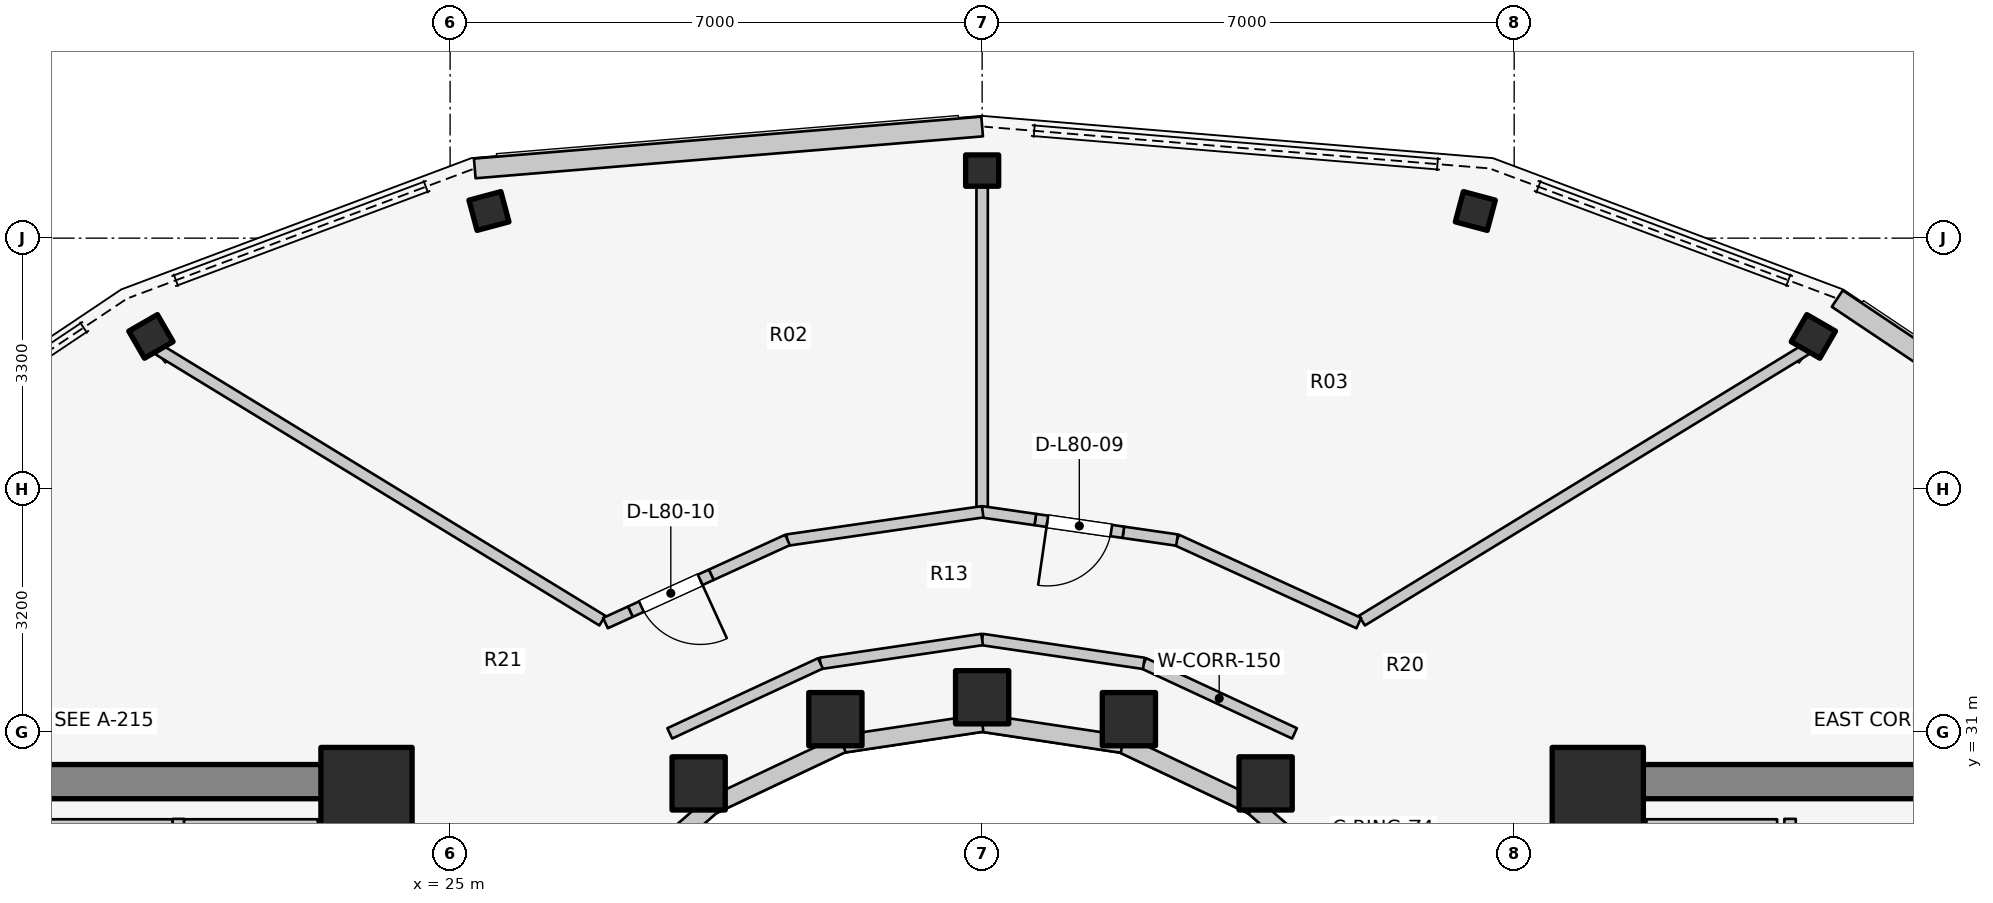
"""IFC4 building model, lengths in metres.
Left out: names, types, materials, properties, quantities, classifications, styles, units other than length and angle.
Written with IfcOpenShell. Run it as: python <this file> out.ifc"""

import sys

from ifc_helpers import new_model, si_unit, direction, frame, frame_2d, origin, origin_2d, place, context, subcontext, project, spatial, rectangle, i_section, extrude, element, fill, save


model = new_model("IFC4")
c1 = context("Model", 3, precision=1e-05, world=origin(), true_north=direction((0.0, 1.0)))
c2 = subcontext(c1, "Body", "Model", "MODEL_VIEW")
j1 = project(units=[si_unit("LENGTHUNIT", "METRE"), si_unit("PLANEANGLEUNIT", "RADIAN")], contexts=[c1])
p1 = place(None, origin())
s1 = spatial("IfcSite", under=j1, at=p1, CompositionType="ELEMENT")
p2 = place(p1, origin())
s2 = spatial("IfcBuilding", under=s1, at=p2, CompositionType="ELEMENT")
p3 = place(p2, frame((0.0, 0.0, 263.6)))
s3 = spatial("IfcBuildingStorey", under=s2, at=p3, CompositionType="ELEMENT", Elevation=263.6)
for number, where, z_axis, x_axis in (
    (1, (19.65, 30.35, 0.0), (0.0, 0.0, 1.0), (1.0, 0.0, 0.0)),
    (2, (39.85, 30.35, 0.0), (0.0, 0.0, 1.0), (1.0, 0.0, 0.0)),
):
    element("IfcWall", number, at=place(p3, frame(where, z_axis=z_axis, x_axis=x_axis)), inside=s3, PredefinedType="SHEAR", context=c2, shape_type="SweptSolid", body=[
        extrude(rectangle(XDim=4.5, YDim=0.45, at=frame_2d((2.25, 0.0))), origin(), (0.0, 0.0, 1.0), 3.2),
    ])
for number, where, z_axis, x_axis in (
    (3, (23.9, 30.2, 0.0), (0.0, 0.0, 1.0), (1.0, 0.0, 0.0)),
    (4, (40.1, 30.2, 0.0), (0.0, 0.0, 1.0), (1.0, 0.0, 0.0)),
):
    element("IfcColumn", number, at=place(p3, frame(where, z_axis=z_axis, x_axis=x_axis)), inside=s3, PredefinedType="COLUMN", context=c2, shape_type="SweptSolid", body=[
        extrude(rectangle(XDim=1.2, YDim=1.2, at=origin_2d()), origin(), (0.0, 0.0, 1.0), 3.2),
    ])
p4 = place(p3, frame((35.73, 30.327, 0.0), z_axis=(0.0, 0.0, 1.0), x_axis=(1.0, 0.0, 0.0)))
e5 = element("IfcColumn", 5, at=p4, inside=s3, PredefinedType="COLUMN", context=c2, shape_type="SweptSolid", body=[
    extrude(rectangle(XDim=0.7, YDim=0.7, at=origin_2d()), origin(), (0.0, 0.0, 1.0), 3.2),
])
p5 = place(p3, frame((42.936, 36.207, 0.0), z_axis=(0.0, 0.0, 1.0), x_axis=(0.5, 0.866025403784, 0.0)))
e6 = element("IfcColumn", 6, at=p5, inside=s3, PredefinedType="COLUMN", context=c2, shape_type="SweptSolid", body=[
    extrude(i_section(OverallWidth=0.412, OverallDepth=0.435, WebThickness=0.036, FlangeThickness=0.057, FilletRadius=0.025, at=origin_2d()), origin(), (0.0, 0.0, 1.0), 3.2),
])
p6 = place(p3, frame((33.931, 31.172, 0.0), z_axis=(0.0, 0.0, 1.0), x_axis=(1.0, 0.0, 0.0)))
e7 = element("IfcColumn", 7, at=p6, inside=s3, PredefinedType="COLUMN", context=c2, shape_type="SweptSolid", body=[
    extrude(rectangle(XDim=0.7, YDim=0.7, at=origin_2d()), origin(), (0.0, 0.0, 1.0), 3.2),
])
p7 = place(p3, frame((38.489, 37.857, 0.0), z_axis=(0.0, 0.0, 1.0), x_axis=(0.258819045103, 0.965925826289, 0.0)))
e8 = element("IfcColumn", 8, at=p7, inside=s3, PredefinedType="COLUMN", context=c2, shape_type="SweptSolid", body=[
    extrude(i_section(OverallWidth=0.412, OverallDepth=0.435, WebThickness=0.036, FlangeThickness=0.057, FilletRadius=0.025, at=origin_2d()), origin(), (0.0, 0.0, 1.0), 3.2),
])
p8 = place(p3, frame((32.0, 31.46, 0.0), z_axis=(0.0, 0.0, 1.0), x_axis=(1.0, 0.0, 0.0)))
e9 = element("IfcColumn", 9, at=p8, inside=s3, PredefinedType="COLUMN", context=c2, shape_type="SweptSolid", body=[
    extrude(rectangle(XDim=0.7, YDim=0.7, at=origin_2d()), origin(), (0.0, 0.0, 1.0), 3.2),
])
p9 = place(p3, frame((32.0, 38.389, 0.0), z_axis=(0.0, 0.0, 1.0), x_axis=(0.0, 1.0, 0.0)))
e10 = element("IfcColumn", 10, at=p9, inside=s3, PredefinedType="COLUMN", context=c2, shape_type="SweptSolid", body=[
    extrude(i_section(OverallWidth=0.412, OverallDepth=0.435, WebThickness=0.036, FlangeThickness=0.057, FilletRadius=0.025, at=origin_2d()), origin(), (0.0, 0.0, 1.0), 3.2),
])
p10 = place(p3, frame((30.069, 31.172, 0.0), z_axis=(0.0, 0.0, 1.0), x_axis=(1.0, 0.0, 0.0)))
e11 = element("IfcColumn", 11, at=p10, inside=s3, PredefinedType="COLUMN", context=c2, shape_type="SweptSolid", body=[
    extrude(rectangle(XDim=0.7, YDim=0.7, at=origin_2d()), origin(), (0.0, 0.0, 1.0), 3.2),
])
p11 = place(p3, frame((25.511, 37.857, 0.0), z_axis=(0.0, 0.0, 1.0), x_axis=(-0.258819045103, 0.965925826289, 0.0)))
e12 = element("IfcColumn", 12, at=p11, inside=s3, PredefinedType="COLUMN", context=c2, shape_type="SweptSolid", body=[
    extrude(i_section(OverallWidth=0.412, OverallDepth=0.435, WebThickness=0.036, FlangeThickness=0.057, FilletRadius=0.025, at=origin_2d()), origin(), (0.0, 0.0, 1.0), 3.2),
])
p12 = place(p3, frame((28.27, 30.327, 0.0), z_axis=(0.0, 0.0, 1.0), x_axis=(1.0, 0.0, 0.0)))
e13 = element("IfcColumn", 13, at=p12, inside=s3, PredefinedType="COLUMN", context=c2, shape_type="SweptSolid", body=[
    extrude(rectangle(XDim=0.7, YDim=0.7, at=origin_2d()), origin(), (0.0, 0.0, 1.0), 3.2),
])
p13 = place(p3, frame((21.064, 36.207, 0.0), z_axis=(0.0, 0.0, 1.0), x_axis=(-0.5, 0.866025403784, 0.0)))
e14 = element("IfcColumn", 14, at=p13, inside=s3, PredefinedType="COLUMN", context=c2, shape_type="SweptSolid", body=[
    extrude(i_section(OverallWidth=0.412, OverallDepth=0.435, WebThickness=0.036, FlangeThickness=0.057, FilletRadius=0.025, at=origin_2d()), origin(), (0.0, 0.0, 1.0), 3.2),
])
p14 = place(p3, frame((37.035, 28.742, 0.0), z_axis=(0.0, 0.0, 1.0), x_axis=(-0.752576694707, 0.658504607869, 0.0)))
e15 = element("IfcWall", 15, at=p14, inside=s3, PredefinedType="STANDARD", context=c2, shape_type="SweptSolid", body=[
    extrude(rectangle(XDim=1.959, YDim=0.23, at=frame_2d((0.98, 0.0))), origin(), (0.0, 0.0, 1.0), 1.32),
])
p15 = place(p3, frame((35.56, 30.032, 0.0), z_axis=(0.0, 0.0, 1.0), x_axis=(-0.904179699603, 0.427152280606, 0.0)))
e16 = element("IfcWall", 16, at=p15, inside=s3, PredefinedType="STANDARD", context=c2, shape_type="SweptSolid", body=[
    extrude(rectangle(XDim=1.899, YDim=0.23, at=frame_2d((0.95, 0.0))), origin(), (0.0, 0.0, 1.0), 1.32),
])
for number, where, z_axis, x_axis in (
    (17, (33.843, 30.843, 0.0), (0.0, 0.0, 1.0), (-0.989, 0.149, 0.0)),
    (18, (32.0, 31.12, 0.0), (0.0, 0.0, 1.0), (-0.989, -0.149, 0.0)),
):
    element("IfcWall", number, at=place(p3, frame(where, z_axis=z_axis, x_axis=x_axis)), inside=s3, PredefinedType="STANDARD", context=c2, shape_type="SweptSolid", body=[
        extrude(rectangle(XDim=1.864, YDim=0.23, at=frame_2d((0.932, 0.0))), origin(), (0.0, 0.0, 1.0), 1.32),
    ])
p16 = place(p3, frame((30.157, 30.843, 0.0), z_axis=(0.0, 0.0, 1.0), x_axis=(-0.904179699603, -0.427152280606, 0.0)))
e19 = element("IfcWall", 19, at=p16, inside=s3, PredefinedType="STANDARD", context=c2, shape_type="SweptSolid", body=[
    extrude(rectangle(XDim=1.899, YDim=0.23, at=frame_2d((0.95, 0.0))), origin(), (0.0, 0.0, 1.0), 1.32),
])
p17 = place(p3, frame((28.44, 30.032, 0.0), z_axis=(0.0, 0.0, 1.0), x_axis=(-0.752576694707, -0.658504607869, 0.0)))
e20 = element("IfcWall", 20, at=p17, inside=s3, PredefinedType="STANDARD", context=c2, shape_type="SweptSolid", body=[
    extrude(rectangle(XDim=1.959, YDim=0.23, at=frame_2d((0.98, 0.0))), origin(), (0.0, 0.0, 1.0), 1.32),
])
p18 = place(p3, frame((46.746, 34.365, 0.0), z_axis=(0.0, 0.0, 1.0), x_axis=(-0.83095030216, 0.556346650336, 0.0)))
e21 = element("IfcWall", 21, at=p18, inside=s3, PredefinedType="STANDARD", context=c2, shape_type="SweptSolid", body=[
    extrude(rectangle(XDim=4.206, YDim=0.26, at=frame_2d((2.103, 0.0))), origin(), (0.0, 0.0, 1.0), 1.32),
])
p19 = place(p3, frame((32.0, 38.969, 0.0), z_axis=(0.0, 0.0, 1.0), x_axis=(-0.996601833255, -0.08236981214, 0.0)))
e22 = element("IfcWall", 22, at=p19, inside=s3, PredefinedType="STANDARD", context=c2, shape_type="SweptSolid", body=[
    extrude(rectangle(XDim=6.698, YDim=0.26, at=frame_2d((3.349, 0.0))), origin(), (0.0, 0.0, 1.0), 1.32),
])
p20 = place(p3, frame((19.59, 29.78, 0.0), z_axis=(0.0, 0.0, 1.0), x_axis=(1.0, 0.0, 0.0)))
e23 = element("IfcWall", 23, at=p20, inside=s3, PredefinedType="SOLIDWALL", context=c2, shape_type="SweptSolid", body=[
    extrude(rectangle(XDim=1.76, YDim=0.15, at=frame_2d((0.88, 0.0))), origin(), (0.0, 0.0, 1.0), 2.915),
])
p21 = place(p3, frame((21.425, 27.14, 0.0), z_axis=(0.0, 0.0, 1.0), x_axis=(0.0, 1.0, 0.0)))
e24 = element("IfcWall", 24, at=p21, inside=s3, PredefinedType="SOLIDWALL", context=c2, shape_type="SweptSolid", body=[
    extrude(rectangle(XDim=2.72, YDim=0.15, at=frame_2d((1.36, 0.0))), origin(), (0.0, 0.0, 1.0), 2.915),
])
p22 = place(p3, frame((21.5, 29.78, 0.0), z_axis=(0.0, 0.0, 1.0), x_axis=(1.0, 0.0, 0.0)))
e25 = element("IfcWall", 25, at=p22, inside=s3, PredefinedType="SOLIDWALL", context=c2, shape_type="SweptSolid", body=[
    extrude(rectangle(XDim=1.76, YDim=0.15, at=frame_2d((0.88, 0.0))), origin(), (0.0, 0.0, 1.0), 2.915),
])
p23 = place(p3, frame((23.43, 27.14, 0.0), z_axis=(0.0, 0.0, 1.0), x_axis=(0.0, 1.0, 0.0)))
e26 = element("IfcWall", 26, at=p23, inside=s3, PredefinedType="SOLIDWALL", context=c2, shape_type="SweptSolid", body=[
    extrude(rectangle(XDim=2.72, YDim=0.15, at=frame_2d((1.36, 0.0))), origin(), (0.0, 0.0, 1.0), 1.57),
])
p24 = place(p3, frame((40.74, 29.78, 0.0), z_axis=(0.0, 0.0, 1.0), x_axis=(1.0, 0.0, 0.0)))
e27 = element("IfcWall", 27, at=p24, inside=s3, PredefinedType="SOLIDWALL", context=c2, shape_type="SweptSolid", body=[
    extrude(rectangle(XDim=1.72, YDim=0.15, at=frame_2d((0.86, 0.0))), origin(), (0.0, 0.0, 1.0), 2.915),
])
p25 = place(p3, frame((40.57, 27.14, 0.0), z_axis=(0.0, 0.0, 1.0), x_axis=(0.0, 1.0, 0.0)))
e28 = element("IfcWall", 28, at=p25, inside=s3, PredefinedType="SOLIDWALL", context=c2, shape_type="SweptSolid", body=[
    extrude(rectangle(XDim=2.72, YDim=0.15, at=frame_2d((1.36, 0.0))), origin(), (0.0, 0.0, 1.0), 1.57),
])
p26 = place(p3, frame((42.63, 27.14, 0.0), z_axis=(0.0, 0.0, 1.0), x_axis=(0.0, 1.0, 0.0)))
e29 = element("IfcWall", 29, at=p26, inside=s3, PredefinedType="SOLIDWALL", context=c2, shape_type="SweptSolid", body=[
    extrude(rectangle(XDim=2.72, YDim=0.15, at=frame_2d((1.36, 0.0))), origin(), (0.0, 0.0, 1.0), 2.915),
])
p27 = place(p3, frame((36.11, 30.985, 0.0), z_axis=(0.0, 0.0, 1.0), x_axis=(-0.906943449489, 0.421252393975, 0.0)))
e30 = element("IfcWall", 30, at=p27, inside=s3, PredefinedType="PARTITIONING", context=c2, shape_type="SweptSolid", body=[
    extrude(rectangle(XDim=2.186, YDim=0.15, at=frame_2d((1.093, 0.0))), origin(), (0.0, 0.0, 1.0), 1.32),
])
for number, where, z_axis, x_axis in (
    (31, (34.127, 31.906, 0.0), (0.0, 0.0, 1.0), (-0.989, 0.146, 0.0)),
    (32, (32.0, 32.22, 0.0), (0.0, 0.0, 1.0), (-0.989, -0.146, 0.0)),
):
    element("IfcWall", number, at=place(p3, frame(where, z_axis=z_axis, x_axis=x_axis)), inside=s3, PredefinedType="PARTITIONING", context=c2, shape_type="SweptSolid", body=[
        extrude(rectangle(XDim=2.151, YDim=0.15, at=frame_2d((1.075, 0.0))), origin(), (0.0, 0.0, 1.0), 1.32),
    ])
p28 = place(p3, frame((29.873, 31.906, 0.0), z_axis=(0.0, 0.0, 1.0), x_axis=(-0.906943449489, -0.421252393975, 0.0)))
e33 = element("IfcWall", 33, at=p28, inside=s3, PredefinedType="PARTITIONING", context=c2, shape_type="SweptSolid", body=[
    extrude(rectangle(XDim=2.186, YDim=0.15, at=frame_2d((1.093, 0.0))), origin(), (0.0, 0.0, 1.0), 1.32),
])
p29 = place(p3, frame((36.997, 32.469, 0.0), z_axis=(0.0, 0.0, 1.0), x_axis=(0.853465247428, 0.521149759122, 0.0)))
e34 = element("IfcWall", 34, at=p29, inside=s3, PredefinedType="PARTITIONING", context=c2, shape_type="SweptSolid", body=[
    extrude(rectangle(XDim=6.842, YDim=0.15, at=frame_2d((3.421, 0.0))), origin(), (0.0, 0.0, 1.0), 1.32),
])
p30 = place(p3, frame((32.0, 33.955, 0.0), z_axis=(0.0, 0.0, 1.0), x_axis=(0.0, 1.0, 0.0)))
e35 = element("IfcWall", 35, at=p30, inside=s3, PredefinedType="PARTITIONING", context=c2, shape_type="SweptSolid", body=[
    extrude(rectangle(XDim=4.234, YDim=0.15, at=frame_2d((2.117, 0.0))), origin(), (0.0, 0.0, 1.0), 1.32),
])
p31 = place(p3, frame((27.003, 32.469, 0.0), z_axis=(0.0, 0.0, 1.0), x_axis=(-0.853465247428, 0.521149759122, 0.0)))
e36 = element("IfcWall", 36, at=p31, inside=s3, PredefinedType="PARTITIONING", context=c2, shape_type="SweptSolid", body=[
    extrude(rectangle(XDim=6.842, YDim=0.15, at=frame_2d((3.421, 0.0))), origin(), (0.0, 0.0, 1.0), 1.32),
])
p32 = place(p3, frame((36.956, 32.436, 0.0), z_axis=(0.0, 0.0, 1.0), x_axis=(-0.909736731002, 0.415185597373, 0.0)))
e37 = element("IfcWall", 37, at=p32, inside=s3, PredefinedType="PARTITIONING", context=c2, shape_type="SweptSolid", body=[
    extrude(rectangle(XDim=2.633, YDim=0.15, at=frame_2d((1.317, 0.0))), origin(), (0.0, 0.0, 1.0), 1.32),
])
p33 = place(p3, frame((34.564, 33.528, 0.0), z_axis=(0.0, 0.0, 1.0), x_axis=(-0.98967396594, 0.143336810138, 0.0)))
e38 = element("IfcWall", 38, at=p33, inside=s3, PredefinedType="PARTITIONING", context=c2, shape_type="SweptSolid", body=[
    extrude(rectangle(XDim=0.714, YDim=0.15, at=frame_2d((0.357, 0.0))), origin(), (0.0, 0.0, 1.0), 2.915),
])
p34 = place(p3, frame((33.858, 33.63, 0.0), z_axis=(0.0, 0.0, 1.0), x_axis=(-0.989701767603, 0.143144721184, 0.0)))
e39 = element("IfcWall", 39, at=p34, inside=s3, PredefinedType="PARTITIONING", context=c2, shape_type="SweptSolid", body=[
    extrude(rectangle(XDim=1.17, YDim=0.15, at=frame_2d((0.585, 0.0))), origin(), (0.0, 0.0, 1.0), 2.915),
])
p35 = place(p34, frame((0.16, 0.0, 0.0)))
e40 = element("IfcOpeningElement", 40, at=p35, cuts=e39, PredefinedType="OPENING", context=c2, shape_type="SweptSolid", body=[
    extrude(rectangle(XDim=0.85, YDim=2.05, at=frame_2d((0.425, 1.025))), frame((0.0, 0.085, 0.0), z_axis=(0.0, -1.0, 0.0), x_axis=(1.0, 0.0, 0.0)), (0.0, 0.0, 1.0), 0.17),
])
p36 = place(p3, frame((32.7, 33.798, 0.0), z_axis=(0.0, 0.0, 1.0), x_axis=(-0.989729432137, 0.142953318118, 0.0)))
e41 = element("IfcWall", 41, at=p36, inside=s3, PredefinedType="PARTITIONING", context=c2, shape_type="SweptSolid", body=[
    extrude(rectangle(XDim=0.714, YDim=0.15, at=frame_2d((0.357, 0.0))), origin(), (0.0, 0.0, 1.0), 1.32),
])
p37 = place(p3, frame((32.007, 33.9, 0.0), z_axis=(0.0, 0.0, 1.0), x_axis=(-0.989701742337, -0.143144895876, 0.0)))
e42 = element("IfcWall", 42, at=p37, inside=s3, PredefinedType="PARTITIONING", context=c2, shape_type="SweptSolid", body=[
    extrude(rectangle(XDim=2.598, YDim=0.15, at=frame_2d((1.299, 0.0))), origin(), (0.0, 0.0, 1.0), 1.32),
])
p38 = place(p3, frame((29.439, 33.529, 0.0), z_axis=(0.0, 0.0, 1.0), x_axis=(-0.909797051829, -0.415053399557, 0.0)))
e43 = element("IfcWall", 43, at=p38, inside=s3, PredefinedType="PARTITIONING", context=c2, shape_type="SweptSolid", body=[
    extrude(rectangle(XDim=1.103, YDim=0.15, at=frame_2d((0.551, 0.0))), origin(), (0.0, 0.0, 1.0), 1.32),
])
p39 = place(p3, frame((28.436, 33.071, 0.0), z_axis=(0.0, 0.0, 1.0), x_axis=(-0.90972227288, -0.415217275925, 0.0)))
e44 = element("IfcWall", 44, at=p39, inside=s3, PredefinedType="PARTITIONING", context=c2, shape_type="SweptSolid", body=[
    extrude(rectangle(XDim=1.17, YDim=0.15, at=frame_2d((0.585, 0.0))), origin(), (0.0, 0.0, 1.0), 2.11),
])
p40 = place(p39, frame((0.16, 0.0, 0.0)))
e45 = element("IfcOpeningElement", 45, at=p40, cuts=e44, PredefinedType="OPENING", context=c2, shape_type="SweptSolid", body=[
    extrude(rectangle(XDim=0.85, YDim=2.05, at=frame_2d((0.425, 1.025))), frame((0.0, 0.085, 0.0), z_axis=(0.0, -1.0, 0.0), x_axis=(1.0, 0.0, 0.0)), (0.0, 0.0, 1.0), 0.17),
])
p41 = place(p3, frame((27.372, 32.585, 0.0), z_axis=(0.0, 0.0, 1.0), x_axis=(-0.909598918169, -0.415487434305, 0.0)))
e46 = element("IfcWall", 46, at=p41, inside=s3, PredefinedType="PARTITIONING", context=c2, shape_type="SweptSolid", body=[
    extrude(rectangle(XDim=0.36, YDim=0.15, at=frame_2d((0.18, 0.0))), origin(), (0.0, 0.0, 1.0), 2.915),
])
p42 = place(p35, origin())
e47 = element("IfcDoor", 47, at=p42, inside=s3, OperationType="SINGLE_SWING_RIGHT", PredefinedType="DOOR", context=c2, shape_type="SweptSolid", body=[
    extrude(rectangle(XDim=0.85, YDim=2.05, at=frame_2d((0.425, 1.025))), frame((0.0, 0.025, 0.0), z_axis=(0.0, -1.0, 0.0), x_axis=(1.0, 0.0, 0.0)), (0.0, 0.0, 1.0), 0.05),
])
fill(e40, e47)
p43 = place(p40, origin())
e48 = element("IfcDoor", 48, at=p43, inside=s3, OperationType="SINGLE_SWING_LEFT", PredefinedType="DOOR", context=c2, shape_type="SweptSolid", body=[
    extrude(rectangle(XDim=0.85, YDim=2.05, at=frame_2d((0.425, 1.025))), frame((0.0, 0.025, 0.0), z_axis=(0.0, -1.0, 0.0), x_axis=(1.0, 0.0, 0.0)), (0.0, 0.0, 1.0), 0.05),
])
fill(e45, e48)
save(model, sys.argv[1])
